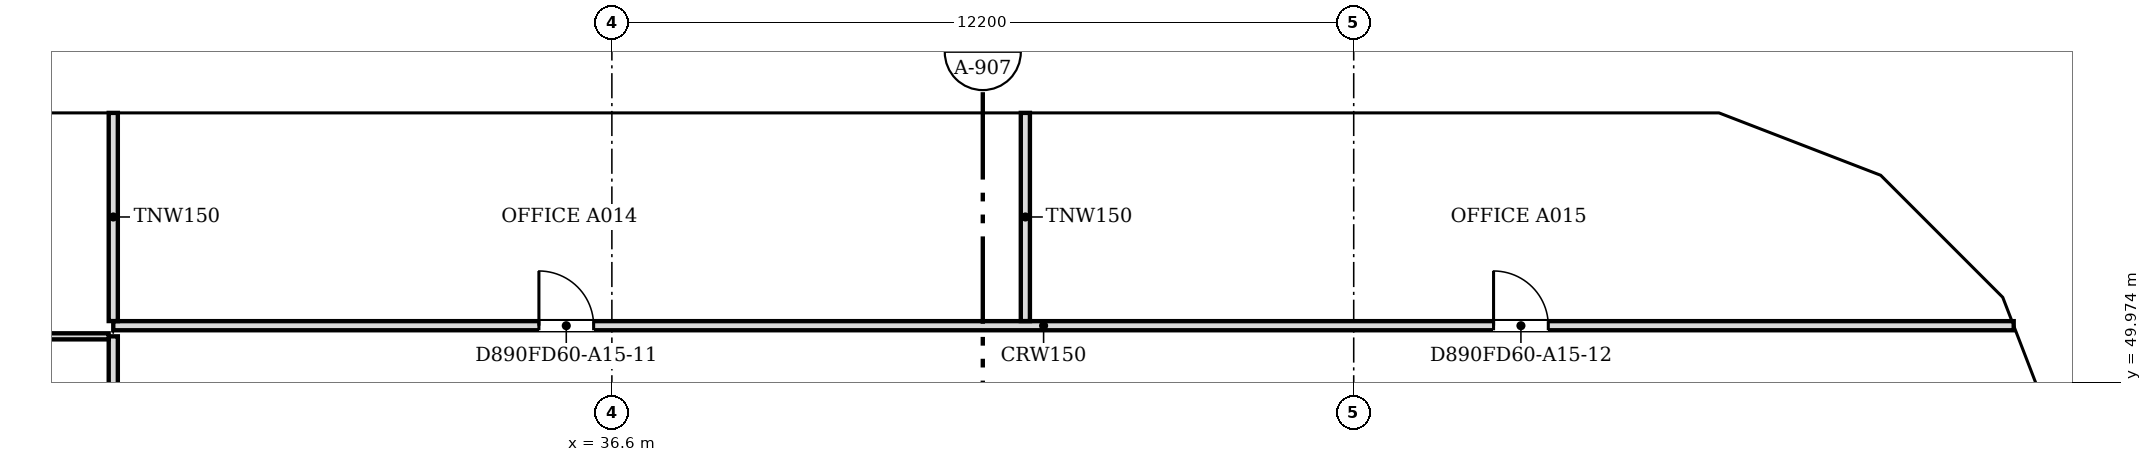
"""IFC4 building model, lengths in metres.
Left out: names, types, materials, properties, quantities, classifications, styles, units other than length and angle.
Written with IfcOpenShell. Run it as: python <this file> out.ifc"""

import sys

from ifc_helpers import new_model, si_unit, direction, frame, frame_2d, origin, place, context, subcontext, project, spatial, polyline, rectangle, outline, extrude, faceted_brep, source, transform, mapped, element, fill, save


model = new_model("IFC4")
c1 = context("Model", 3, precision=1e-05, world=origin(), true_north=direction((0.0, 1.0)))
c2 = subcontext(c1, "Body", "Model", "MODEL_VIEW")
j1 = project(units=[si_unit("LENGTHUNIT", "METRE"), si_unit("PLANEANGLEUNIT", "RADIAN")], contexts=[c1])
p1 = place(None, origin())
s1 = spatial("IfcSite", under=j1, at=p1, CompositionType="ELEMENT")
p2 = place(p1, origin())
s2 = spatial("IfcBuilding", under=s1, at=p2, CompositionType="ELEMENT")
p3 = place(p2, frame((0.0, 0.0, 166.8)))
s3 = spatial("IfcBuildingStorey", under=s2, at=p3, CompositionType="ELEMENT", Elevation=166.8)
m1 = source(origin(), c2, "Body", "Brep", [
    faceted_brep([(0.047, -0.25, 0.0), (2.997, -0.25, 3.8), (0.047, -0.25, 7.6), (0.0, -0.25, 7.541), (0.0, -0.25, 0.059), (0.093, 0.25, 7.54), (2.944, 0.25, 3.868), (2.944, 0.25, 3.732), (0.093, 0.25, 0.06), (2.997, 0.0, 3.8), (0.047, 0.0, 0.0), (0.047, 0.0, 7.6)], [[[0, 1, 2, 3, 4]], [[5, 6, 7, 8]], [[8, 7, 9, 1, 0, 10]], [[6, 5, 11, 2, 1, 9]], [[3, 2, 11]], [[10, 0, 4]], [[8, 10, 4, 3, 11, 5]], [[9, 7, 6]]]),
])
p4 = place(p3, frame((60.767, 48.71, -3.8), z_axis=(0.0, 0.0, 1.0), x_axis=(-0.359901446078, 0.932990326376, 0.0)))
e1 = element("IfcWall", 1, at=p4, inside=s3, PredefinedType="SOLIDWALL", context=c2, shape_type="MappedRepresentation", body=[
    mapped(m1, transform((0.0, 0.0, 0.0), scale=1.0)),
])
m2 = source(origin(), c2, "Body", "SweptSolid", [
    extrude(outline(polyline([(0.247, 0.665), (2.681, 3.8), (0.247, 6.935), (0.247, 0.665)])), frame((0.0, 0.26, 0.0), z_axis=(0.0, -1.0, 0.0), x_axis=(1.0, 0.0, 0.0)), (0.0, 0.0, 1.0), 0.52),
])
p5 = place(p4, origin())
e2 = element("IfcOpeningElement", 2, at=p5, cuts=e1, PredefinedType="OPENING", context=c2, shape_type="MappedRepresentation", body=[
    mapped(m2, transform((0.0, 0.0, 0.0), scale=1.0)),
])
m3 = source(origin(), c2, "Body", "Brep", [
    faceted_brep([(2.944, -0.25, 0.0), (2.997, -0.25, 0.068), (2.997, -0.25, 7.532), (2.944, -0.25, 7.6), (0.0, -0.25, 3.8), (0.053, 0.25, 3.868), (2.891, 0.25, 7.532), (2.891, 0.25, 0.068), (0.053, 0.25, 3.732), (2.944, 0.0, 0.0), (2.944, 0.0, 7.6), (0.0, 0.0, 3.8)], [[[0, 1, 2, 3, 4]], [[5, 6, 7, 8]], [[1, 0, 9]], [[10, 3, 2]], [[6, 5, 11, 4, 3, 10]], [[8, 7, 9, 0, 4, 11]], [[8, 11, 5]], [[1, 9, 7, 6, 10, 2]]]),
])
p6 = place(p3, frame((59.688, 51.506, -3.8), z_axis=(0.0, 0.0, 1.0), x_axis=(-0.707106781187, 0.707106781187, 0.0)))
e3 = element("IfcWall", 3, at=p6, inside=s3, PredefinedType="SOLIDWALL", context=c2, shape_type="MappedRepresentation", body=[
    mapped(m3, transform((0.0, 0.0, 0.0), scale=1.0)),
])
m4 = source(origin(), c2, "Body", "SweptSolid", [
    extrude(outline(polyline([(2.744, 6.934), (0.316, 3.8), (2.744, 0.666), (2.744, 6.934)])), frame((0.0, 0.26, 0.0), z_axis=(0.0, -1.0, 0.0), x_axis=(1.0, 0.0, 0.0)), (0.0, 0.0, 1.0), 0.52),
])
p7 = place(p6, origin())
e4 = element("IfcOpeningElement", 4, at=p7, cuts=e3, PredefinedType="OPENING", context=c2, shape_type="MappedRepresentation", body=[
    mapped(m4, transform((0.0, 0.0, 0.0), scale=1.0)),
])
m5 = source(origin(), c2, "Body", "Brep", [
    faceted_brep([(0.053, -0.25, 0.0), (3.003, -0.25, 3.8), (0.053, -0.25, 7.6), (0.0, -0.25, 7.532), (0.0, -0.25, 0.068), (0.106, 0.25, 7.532), (2.957, 0.25, 3.86), (2.957, 0.25, 3.74), (0.106, 0.25, 0.068), (3.003, 0.0, 3.8), (0.053, 0.0, 0.0), (0.053, 0.0, 7.6)], [[[0, 1, 2, 3, 4]], [[5, 6, 7, 8]], [[8, 7, 9, 1, 0, 10]], [[6, 5, 11, 2, 1, 9]], [[3, 2, 11]], [[10, 0, 4]], [[8, 10, 4, 3, 11, 5]], [[9, 7, 6]]]),
])
p8 = place(p3, frame((57.656, 53.569, -3.8), z_axis=(0.0, 0.0, 1.0), x_axis=(-0.933007896601, 0.359855894603, 0.0)))
e5 = element("IfcWall", 5, at=p8, inside=s3, PredefinedType="SOLIDWALL", context=c2, shape_type="MappedRepresentation", body=[
    mapped(m5, transform((0.0, 0.0, 0.0), scale=1.0)),
])
m6 = source(origin(), c2, "Body", "SweptSolid", [
    extrude(outline(polyline([(0.253, 0.665), (2.687, 3.8), (0.253, 6.935), (0.253, 0.665)])), frame((0.0, 0.26, 0.0), z_axis=(0.0, -1.0, 0.0), x_axis=(1.0, 0.0, 0.0)), (0.0, 0.0, 1.0), 0.52),
])
p9 = place(p8, origin())
e6 = element("IfcOpeningElement", 6, at=p9, cuts=e5, PredefinedType="OPENING", context=c2, shape_type="MappedRepresentation", body=[
    mapped(m6, transform((0.0, 0.0, 0.0), scale=1.0)),
])
m7 = source(origin(), c2, "Body", "Brep", [
    faceted_brep([(3.003, -0.25, 0.0), (6.053, -0.25, 3.8), (3.003, -0.25, 7.6), (0.0, -0.25, 3.8), (0.047, 0.25, 3.859), (3.003, 0.25, 7.6), (6.053, 0.25, 3.8), (3.003, 0.25, 0.0), (0.047, 0.25, 3.741), (0.0, 0.0, 3.8)], [[[0, 1, 2, 3]], [[4, 5, 6, 7, 8]], [[7, 6, 1, 0]], [[6, 5, 2, 1]], [[5, 4, 9, 3, 2]], [[8, 7, 0, 3, 9]], [[8, 9, 4]]]),
])
p10 = place(p3, frame((54.854, 54.65, -3.8), z_axis=(0.0, 0.0, 1.0), x_axis=(-1.0, 0.0, 0.0)))
e7 = element("IfcWall", 7, at=p10, inside=s3, PredefinedType="SOLIDWALL", context=c2, shape_type="MappedRepresentation", body=[
    mapped(m7, transform((0.0, 0.0, 0.0), scale=1.0)),
])
m8 = source(origin(), c2, "Body", "SweptSolid", [
    extrude(outline(polyline([(3.005, 0.401), (5.733, 3.8), (3.005, 7.199), (0.319, 3.8), (3.005, 0.401)])), frame((0.0, 0.26, 0.0), z_axis=(0.0, -1.0, 0.0), x_axis=(1.0, 0.0, 0.0)), (0.0, 0.0, 1.0), 0.52),
])
p11 = place(p10, origin())
e8 = element("IfcOpeningElement", 8, at=p11, cuts=e7, PredefinedType="OPENING", context=c2, shape_type="MappedRepresentation", body=[
    mapped(m8, transform((0.0, 0.0, 0.0), scale=1.0)),
])
m9 = source(origin(), c2, "Body", "SweptSolid", [
    extrude(outline(polyline([(3.05, 0.0), (6.1, 3.8), (3.05, 7.6), (0.0, 3.8), (3.05, 0.0)])), frame((0.0, 0.25, 0.0), z_axis=(0.0, -1.0, 0.0), x_axis=(1.0, 0.0, 0.0)), (0.0, 0.0, 1.0), 0.5),
])
p12 = place(p3, frame((48.8, 54.65, -3.8), z_axis=(0.0, 0.0, 1.0), x_axis=(-1.0, 0.0, 0.0)))
e9 = element("IfcWall", 9, at=p12, inside=s3, PredefinedType="SOLIDWALL", context=c2, shape_type="MappedRepresentation", body=[
    mapped(m9, transform((0.0, 0.0, 0.0), scale=1.0)),
])
m10 = source(origin(), c2, "Body", "SweptSolid", [
    extrude(outline(polyline([(3.05, 0.399), (5.78, 3.8), (3.05, 7.201), (0.321, 3.8), (3.05, 0.399)])), frame((0.0, 0.26, 0.0), z_axis=(0.0, -1.0, 0.0), x_axis=(1.0, 0.0, 0.0)), (0.0, 0.0, 1.0), 0.52),
])
p13 = place(p12, origin())
e10 = element("IfcOpeningElement", 10, at=p13, cuts=e9, PredefinedType="OPENING", context=c2, shape_type="MappedRepresentation", body=[
    mapped(m10, transform((0.0, 0.0, 0.0), scale=1.0)),
])
m11 = source(origin(), c2, "Body", "Brep", [
    faceted_brep([(3.05, -0.25, 0.0), (6.1, -0.25, 3.8), (6.1, -0.25, 3.8), (3.05, -0.25, 7.6), (0.0, -0.25, 3.8), (0.0, 0.25, 3.8), (3.05, 0.25, 7.6), (6.1, 0.25, 3.8), (6.1, 0.25, 3.8), (3.05, 0.25, 0.0)], [[[0, 1, 2, 3, 4]], [[5, 6, 7, 8, 9]], [[9, 8, 1, 0]], [[7, 6, 3, 2]], [[6, 5, 4, 3]], [[5, 9, 0, 4]], [[1, 8, 7, 2]]]),
])
p14 = place(p3, frame((42.7, 54.65, -3.8), z_axis=(0.0, 0.0, 1.0), x_axis=(-1.0, 0.0, 0.0)))
e11 = element("IfcWall", 11, at=p14, inside=s3, PredefinedType="SOLIDWALL", context=c2, shape_type="MappedRepresentation", body=[
    mapped(m11, transform((0.0, 0.0, 0.0), scale=1.0)),
])
p15 = place(p14, origin())
e12 = element("IfcOpeningElement", 12, at=p15, cuts=e11, PredefinedType="OPENING", context=c2, shape_type="MappedRepresentation", body=[
    mapped(m10, transform((0.0, 0.0, 0.0), scale=1.0)),
])
p16 = place(p3, frame((36.6, 54.65, -3.8), z_axis=(0.0, 0.0, 1.0), x_axis=(-1.0, 0.0, 0.0)))
e13 = element("IfcWall", 13, at=p16, inside=s3, PredefinedType="SOLIDWALL", context=c2, shape_type="MappedRepresentation", body=[
    mapped(m9, transform((0.0, 0.0, 0.0), scale=1.0)),
])
p17 = place(p16, origin())
e14 = element("IfcOpeningElement", 14, at=p17, cuts=e13, PredefinedType="OPENING", context=c2, shape_type="MappedRepresentation", body=[
    mapped(m10, transform((0.0, 0.0, 0.0), scale=1.0)),
])
p18 = place(p3, frame((30.5, 54.65, -3.8), z_axis=(0.0, 0.0, 1.0), x_axis=(-1.0, 0.0, 0.0)))
e15 = element("IfcWall", 15, at=p18, inside=s3, PredefinedType="SOLIDWALL", context=c2, shape_type="MappedRepresentation", body=[
    mapped(m9, transform((0.0, 0.0, 0.0), scale=1.0)),
])
p19 = place(p18, origin())
e16 = element("IfcOpeningElement", 16, at=p19, cuts=e15, PredefinedType="OPENING", context=c2, shape_type="MappedRepresentation", body=[
    mapped(m10, transform((0.0, 0.0, 0.0), scale=1.0)),
])
p20 = place(p2, frame((0.0, 0.0, 170.6)))
s4 = spatial("IfcBuildingStorey", under=s2, at=p20, CompositionType="ELEMENT", Elevation=170.6)
m12 = source(origin(), c2, "Body", "Brep", [
    faceted_brep([(2.95, -0.25, 0.0), (3.003, -0.25, 0.068), (3.003, -0.25, 7.531), (2.95, -0.25, 7.6), (0.0, -0.25, 3.8), (0.047, 0.25, 3.86), (2.898, 0.25, 7.532), (2.898, 0.25, 0.068), (0.047, 0.25, 3.74), (2.95, 0.0, 0.0), (2.95, 0.0, 7.6), (0.0, 0.0, 3.8)], [[[0, 1, 2, 3, 4]], [[5, 6, 7, 8]], [[1, 0, 9]], [[10, 3, 2]], [[6, 5, 11, 4, 3, 10]], [[8, 7, 9, 0, 4, 11]], [[8, 11, 5]], [[1, 9, 7, 6, 10, 2]]]),
])
p21 = place(p20, frame((60.75, 48.753, -3.8), z_axis=(0.0, 0.0, 1.0), x_axis=(-0.35992665181, 0.932980602862, 0.0)))
e17 = element("IfcWall", 17, at=p21, inside=s4, PredefinedType="SOLIDWALL", context=c2, shape_type="MappedRepresentation", body=[
    mapped(m12, transform((0.0, 0.0, 0.0), scale=1.0)),
])
m13 = source(origin(), c2, "Body", "SweptSolid", [
    extrude(outline(polyline([(2.75, 6.935), (0.316, 3.8), (2.75, 0.665), (2.75, 6.935)])), frame((0.0, 0.26, 0.0), z_axis=(0.0, -1.0, 0.0), x_axis=(1.0, 0.0, 0.0)), (0.0, 0.0, 1.0), 0.52),
])
p22 = place(p21, origin())
e18 = element("IfcOpeningElement", 18, at=p22, cuts=e17, PredefinedType="OPENING", context=c2, shape_type="MappedRepresentation", body=[
    mapped(m13, transform((0.0, 0.0, 0.0), scale=1.0)),
])
m14 = source(origin(), c2, "Body", "Brep", [
    faceted_brep([(0.053, -0.25, 0.0), (2.997, -0.25, 3.8), (0.053, -0.25, 7.6), (0.0, -0.25, 7.532), (0.0, -0.25, 0.068), (0.106, 0.25, 7.531), (2.944, 0.25, 3.868), (2.944, 0.25, 3.732), (0.106, 0.25, 0.068), (2.997, 0.0, 3.8), (0.053, 0.0, 0.0), (0.053, 0.0, 7.6)], [[[0, 1, 2, 3, 4]], [[5, 6, 7, 8]], [[8, 7, 9, 1, 0, 10]], [[6, 5, 11, 2, 1, 9]], [[3, 2, 11]], [[10, 0, 4]], [[8, 10, 4, 3, 11, 5]], [[7, 6, 9]]]),
])
p23 = place(p20, frame((59.726, 51.469, -3.8), z_axis=(0.0, 0.0, 1.0), x_axis=(-0.707106781187, 0.707106781187, 0.0)))
e19 = element("IfcWall", 19, at=p23, inside=s4, PredefinedType="SOLIDWALL", context=c2, shape_type="MappedRepresentation", body=[
    mapped(m14, transform((0.0, 0.0, 0.0), scale=1.0)),
])
m15 = source(origin(), c2, "Body", "SweptSolid", [
    extrude(outline(polyline([(0.253, 0.666), (2.681, 3.8), (0.253, 6.934), (0.253, 0.666)])), frame((0.0, 0.26, 0.0), z_axis=(0.0, -1.0, 0.0), x_axis=(1.0, 0.0, 0.0)), (0.0, 0.0, 1.0), 0.52),
])
p24 = place(p23, origin())
e20 = element("IfcOpeningElement", 20, at=p24, cuts=e19, PredefinedType="OPENING", context=c2, shape_type="MappedRepresentation", body=[
    mapped(m15, transform((0.0, 0.0, 0.0), scale=1.0)),
])
m16 = source(origin(), c2, "Body", "Brep", [
    faceted_brep([(2.95, -0.25, 0.0), (2.997, -0.25, 0.059), (2.997, -0.25, 7.541), (2.95, -0.25, 7.6), (0.0, -0.25, 3.8), (0.053, 0.25, 3.868), (2.904, 0.25, 7.54), (2.904, 0.25, 0.06), (0.053, 0.25, 3.732), (2.95, 0.0, 0.0), (2.95, 0.0, 7.6), (0.0, 0.0, 3.8)], [[[0, 1, 2, 3, 4]], [[5, 6, 7, 8]], [[1, 0, 9]], [[10, 3, 2]], [[6, 5, 11, 4, 3, 10]], [[8, 7, 9, 0, 4, 11]], [[8, 11, 5]], [[1, 9, 7, 6, 10, 2]]]),
])
p25 = place(p20, frame((57.606, 53.588, -3.8), z_axis=(0.0, 0.0, 1.0), x_axis=(-0.932990326376, 0.359901446078, 0.0)))
e21 = element("IfcWall", 21, at=p25, inside=s4, PredefinedType="SOLIDWALL", context=c2, shape_type="MappedRepresentation", body=[
    mapped(m16, transform((0.0, 0.0, 0.0), scale=1.0)),
])
p26 = place(p25, origin())
e22 = element("IfcOpeningElement", 22, at=p26, cuts=e21, PredefinedType="OPENING", context=c2, shape_type="MappedRepresentation", body=[
    mapped(m13, transform((0.0, 0.0, 0.0), scale=1.0)),
])
m17 = source(origin(), c2, "Body", "Brep", [
    faceted_brep([(0.047, -0.25, 0.0), (3.05, -0.25, 3.8), (0.047, -0.25, 7.6), (0.0, -0.25, 7.54), (0.0, -0.25, 0.06), (0.093, 0.25, 7.541), (3.05, 0.25, 3.8), (0.093, 0.25, 0.059), (0.047, 0.0, 0.0), (0.047, 0.0, 7.6)], [[[0, 1, 2, 3, 4]], [[5, 6, 7]], [[7, 6, 1, 0, 8]], [[6, 5, 9, 2, 1]], [[3, 2, 9]], [[8, 0, 4]], [[7, 8, 4, 3, 9, 5]]]),
])
p27 = place(p20, frame((54.9, 54.65, -3.8), z_axis=(0.0, 0.0, 1.0), x_axis=(-1.0, 0.0, 0.0)))
e23 = element("IfcWall", 23, at=p27, inside=s4, PredefinedType="SOLIDWALL", context=c2, shape_type="MappedRepresentation", body=[
    mapped(m17, transform((0.0, 0.0, 0.0), scale=1.0)),
])
m18 = source(origin(), c2, "Body", "SweptSolid", [
    extrude(outline(polyline([(0.247, 0.656), (2.731, 3.8), (0.247, 6.944), (0.247, 0.656)])), frame((0.0, 0.26, 0.0), z_axis=(0.0, -1.0, 0.0), x_axis=(1.0, 0.0, 0.0)), (0.0, 0.0, 1.0), 0.52),
])
p28 = place(p27, origin())
e24 = element("IfcOpeningElement", 24, at=p28, cuts=e23, PredefinedType="OPENING", context=c2, shape_type="MappedRepresentation", body=[
    mapped(m18, transform((0.0, 0.0, 0.0), scale=1.0)),
])
m19 = source(origin(), c2, "Body", "SweptSolid", [
    extrude(outline(polyline([(3.05, 0.0), (6.1, 3.8), (3.05, 7.6), (0.0, 3.8), (3.05, 0.0)])), frame((0.0, 0.25, 0.0), z_axis=(0.0, -1.0, 0.0), x_axis=(1.0, 0.0, 0.0)), (0.0, 0.0, 1.0), 0.5),
])
p29 = place(p20, frame((51.85, 54.65, -3.8), z_axis=(0.0, 0.0, 1.0), x_axis=(-1.0, 0.0, 0.0)))
e25 = element("IfcWall", 25, at=p29, inside=s4, PredefinedType="SOLIDWALL", context=c2, shape_type="MappedRepresentation", body=[
    mapped(m19, transform((0.0, 0.0, 0.0), scale=1.0)),
])
m20 = source(origin(), c2, "Body", "SweptSolid", [
    extrude(outline(polyline([(3.05, 0.399), (5.78, 3.8), (3.05, 7.2), (0.321, 3.8), (3.05, 0.399)])), frame((0.0, 0.26, 0.0), z_axis=(0.0, -1.0, 0.0), x_axis=(1.0, 0.0, 0.0)), (0.0, 0.0, 1.0), 0.52),
])
p30 = place(p29, origin())
e26 = element("IfcOpeningElement", 26, at=p30, cuts=e25, PredefinedType="OPENING", context=c2, shape_type="MappedRepresentation", body=[
    mapped(m20, transform((0.0, 0.0, 0.0), scale=1.0)),
])
p31 = place(p20, frame((45.75, 54.65, -3.8), z_axis=(0.0, 0.0, 1.0), x_axis=(-1.0, 0.0, 0.0)))
e27 = element("IfcWall", 27, at=p31, inside=s4, PredefinedType="SOLIDWALL", context=c2, shape_type="MappedRepresentation", body=[
    mapped(m19, transform((0.0, 0.0, 0.0), scale=1.0)),
])
p32 = place(p31, origin())
e28 = element("IfcOpeningElement", 28, at=p32, cuts=e27, PredefinedType="OPENING", context=c2, shape_type="MappedRepresentation", body=[
    mapped(m20, transform((0.0, 0.0, 0.0), scale=1.0)),
])
m21 = source(origin(), c2, "Body", "Brep", [
    faceted_brep([(3.05, -0.25, 0.0), (6.1, -0.25, 3.8), (6.1, -0.25, 3.8), (3.05, -0.25, 7.6), (0.0, -0.25, 3.8), (0.0, 0.25, 3.8), (3.05, 0.25, 7.6), (6.1, 0.25, 3.8), (6.1, 0.25, 3.8), (3.05, 0.25, 0.0)], [[[0, 1, 2, 3, 4]], [[5, 6, 7, 8, 9]], [[9, 8, 1, 0]], [[7, 6, 3, 2]], [[6, 5, 4, 3]], [[5, 9, 0, 4]], [[1, 8, 7, 2]]]),
])
p33 = place(p20, frame((39.65, 54.65, -3.8), z_axis=(0.0, 0.0, 1.0), x_axis=(-1.0, 0.0, 0.0)))
e29 = element("IfcWall", 29, at=p33, inside=s4, PredefinedType="SOLIDWALL", context=c2, shape_type="MappedRepresentation", body=[
    mapped(m21, transform((0.0, 0.0, 0.0), scale=1.0)),
])
p34 = place(p33, origin())
e30 = element("IfcOpeningElement", 30, at=p34, cuts=e29, PredefinedType="OPENING", context=c2, shape_type="MappedRepresentation", body=[
    mapped(m20, transform((0.0, 0.0, 0.0), scale=1.0)),
])
p35 = place(p20, frame((33.55, 54.65, -3.8), z_axis=(0.0, 0.0, 1.0), x_axis=(-1.0, 0.0, 0.0)))
e31 = element("IfcWall", 31, at=p35, inside=s4, PredefinedType="SOLIDWALL", context=c2, shape_type="MappedRepresentation", body=[
    mapped(m19, transform((0.0, 0.0, 0.0), scale=1.0)),
])
p36 = place(p35, origin())
e32 = element("IfcOpeningElement", 32, at=p36, cuts=e31, PredefinedType="OPENING", context=c2, shape_type="MappedRepresentation", body=[
    mapped(m20, transform((0.0, 0.0, 0.0), scale=1.0)),
])
p37 = place(p20, frame((27.45, 54.65, -3.8), z_axis=(0.0, 0.0, 1.0), x_axis=(-1.0, 0.0, 0.0)))
e33 = element("IfcWall", 33, at=p37, inside=s4, PredefinedType="SOLIDWALL", context=c2, shape_type="MappedRepresentation", body=[
    mapped(m21, transform((0.0, 0.0, 0.0), scale=1.0)),
])
p38 = place(p37, origin())
e34 = element("IfcOpeningElement", 34, at=p38, cuts=e33, PredefinedType="OPENING", context=c2, shape_type="MappedRepresentation", body=[
    mapped(m20, transform((0.0, 0.0, 0.0), scale=1.0)),
])
p39 = place(p3, frame((28.4, 48.176, 0.0), z_axis=(0.0, 0.0, 1.0), x_axis=(0.0, 1.0, 0.0)))
e35 = element("IfcWall", 35, at=p39, inside=s3, PredefinedType="PARTITIONING", context=c2, shape_type="SweptSolid", body=[
    extrude(rectangle(XDim=2.549, YDim=0.15, at=frame_2d((1.274, 0.0))), origin(), (0.0, 0.0, 1.0), 3.067),
])
p40 = place(p3, frame((19.776, 50.725, 0.0), z_axis=(0.0, 0.0, 1.0), x_axis=(1.0, 0.0, 0.0)))
e36 = element("IfcWall", 36, at=p40, inside=s3, PredefinedType="PARTITIONING", context=c2, shape_type="SweptSolid", body=[
    extrude(rectangle(XDim=8.548, YDim=0.1, at=frame_2d((4.274, 0.0))), origin(), (0.0, 0.0, 1.0), 3.067),
])
m22 = source(origin(), c2, "Body", "SweptSolid", [
    extrude(rectangle(XDim=0.9, YDim=2.1, at=frame_2d((0.45, 1.05))), frame((0.0, 0.06, 0.0), z_axis=(0.0, -1.0, 0.0), x_axis=(1.0, 0.0, 0.0)), (0.0, 0.0, 1.0), 0.12),
])
p41 = place(p40, frame((1.6, 0.0, 0.0)))
e37 = element("IfcOpeningElement", 37, at=p41, cuts=e36, PredefinedType="OPENING", context=c2, shape_type="MappedRepresentation", body=[
    mapped(m22, transform((0.0, 0.0, 0.0), scale=1.0)),
])
p42 = place(p40, frame((5.927, 0.0, 0.0)))
e38 = element("IfcOpeningElement", 38, at=p42, cuts=e36, PredefinedType="OPENING", context=c2, shape_type="MappedRepresentation", body=[
    mapped(m22, transform((0.0, 0.0, 0.0), scale=1.0)),
])
p43 = place(p3, frame((28.4, 50.9, 0.0), z_axis=(0.0, 0.0, 1.0), x_axis=(1.0, 0.0, 0.0)))
e39 = element("IfcWall", 39, at=p43, inside=s3, PredefinedType="PARTITIONING", context=c2, shape_type="SweptSolid", body=[
    extrude(rectangle(XDim=31.254, YDim=0.15, at=frame_2d((15.627, 0.0))), origin(), (0.0, 0.0, 1.0), 3.067),
])
m23 = source(origin(), c2, "Body", "SweptSolid", [
    extrude(rectangle(XDim=0.9, YDim=2.1, at=frame_2d((0.45, 1.05))), frame((0.0, 0.085, 0.0), z_axis=(0.0, -1.0, 0.0), x_axis=(1.0, 0.0, 0.0)), (0.0, 0.0, 1.0), 0.17),
])
p44 = place(p43, frame((7.0, 0.0, 0.0)))
e40 = element("IfcOpeningElement", 40, at=p44, cuts=e39, PredefinedType="OPENING", context=c2, shape_type="MappedRepresentation", body=[
    mapped(m23, transform((0.0, 0.0, 0.0), scale=1.0)),
])
p45 = place(p43, frame((22.7, 0.0, 0.0)))
e41 = element("IfcOpeningElement", 41, at=p45, cuts=e39, PredefinedType="OPENING", context=c2, shape_type="MappedRepresentation", body=[
    mapped(m23, transform((0.0, 0.0, 0.0), scale=1.0)),
])
for number, where, z_axis, x_axis in (
    (42, (28.4, 50.976, 0.0), (0.0, 0.0, 1.0), (0.0, 1.0, 0.0)),
    (43, (43.4, 50.976, 0.0), (0.0, 0.0, 1.0), (0.0, 1.0, 0.0)),
):
    element("IfcWall", number, at=place(p3, frame(where, z_axis=z_axis, x_axis=x_axis)), inside=s3, PredefinedType="PARTITIONING", context=c2, shape_type="SweptSolid", body=[
        extrude(rectangle(XDim=3.424, YDim=0.15, at=frame_2d((1.712, 0.0))), origin(), (0.0, 0.0, 1.0), 3.067),
    ])
m24 = source(origin(), c2, "Body", "SweptSolid", [
    extrude(rectangle(XDim=0.9, YDim=2.1, at=frame_2d((0.45, 1.05))), frame((0.0, 0.025, 0.0), z_axis=(0.0, -1.0, 0.0), x_axis=(1.0, 0.0, 0.0)), (0.0, 0.0, 1.0), 0.05),
])
p46 = place(p44, origin())
e44 = element("IfcDoor", 44, at=p46, inside=s3, OperationType="SINGLE_SWING_LEFT", PredefinedType="DOOR", context=c2, shape_type="MappedRepresentation", body=[
    mapped(m24, transform((0.0, 0.0, 0.0), scale=1.0)),
])
fill(e40, e44)
p47 = place(p45, origin())
e45 = element("IfcDoor", 45, at=p47, inside=s3, OperationType="SINGLE_SWING_LEFT", PredefinedType="DOOR", context=c2, shape_type="MappedRepresentation", body=[
    mapped(m24, transform((0.0, 0.0, 0.0), scale=1.0)),
])
fill(e41, e45)
save(model, sys.argv[1])
